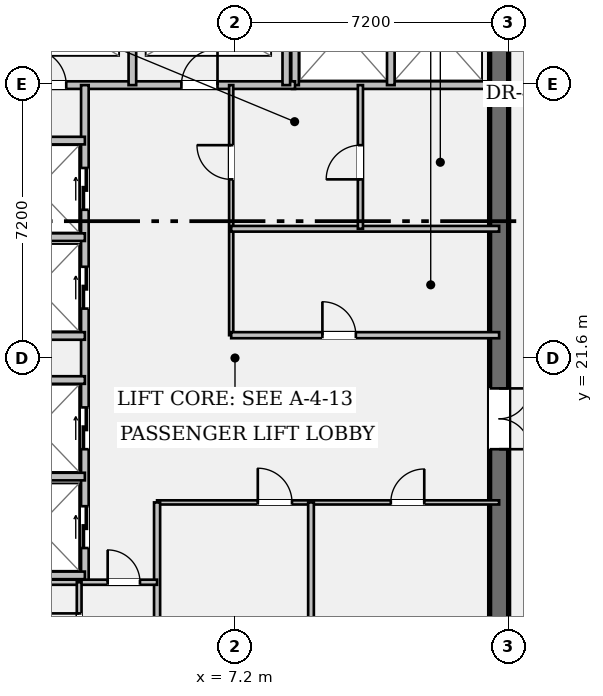
"""IFC4 building model, lengths in metres.
Left out: names, types, materials, properties, quantities, classifications, styles, units other than length and angle.
Written with IfcOpenShell. Run it as: python <this file> out.ifc"""

import sys

from ifc_helpers import new_model, si_unit, direction, frame, frame_2d, origin, place, context, subcontext, project, spatial, rectangle, extrude, element, fill, save


model = new_model("IFC4")
c1 = context("Model", 3, precision=1e-05, world=origin(), true_north=direction((0.0, 1.0)))
c2 = subcontext(c1, "Body", "Model", "MODEL_VIEW")
j1 = project(units=[si_unit("LENGTHUNIT", "METRE"), si_unit("PLANEANGLEUNIT", "RADIAN")], contexts=[c1])
p1 = place(None, origin())
s1 = spatial("IfcSite", under=j1, at=p1, CompositionType="ELEMENT")
p2 = place(p1, origin())
s2 = spatial("IfcBuilding", under=s1, at=p2, CompositionType="ELEMENT")
p3 = place(p2, frame((0.0, 0.0, 255.15)))
s3 = spatial("IfcBuildingStorey", under=s2, at=p3, CompositionType="ELEMENT", Elevation=255.15)
p4 = place(p3, frame((14.15, 35.5, 0.0), z_axis=(0.0, 0.0, 1.0), x_axis=(0.0, -1.0, 0.0)))
e1 = element("IfcWall", 1, at=p4, inside=s3, PredefinedType="SHEAR", context=c2, shape_type="SweptSolid", body=[
    extrude(rectangle(XDim=27.8, YDim=0.5, at=frame_2d((13.9, 0.0))), origin(), (0.0, 0.0, 1.0), 3.24),
])
p5 = place(p4, frame((1.4, 0.0, 0.0)))
e2 = element("IfcOpeningElement", 2, at=p5, cuts=e1, PredefinedType="OPENING", context=c2, shape_type="SweptSolid", body=[
    extrude(rectangle(XDim=1.2, YDim=2.15, at=frame_2d((0.6, 1.075))), frame((0.0, 0.262, 0.0), z_axis=(0.0, -1.0, 0.0), x_axis=(1.0, 0.0, 0.0)), (0.0, 0.0, 1.0), 0.524),
])
p6 = place(p4, frame((25.35, 0.0, 0.0)))
e3 = element("IfcOpeningElement", 3, at=p6, cuts=e1, PredefinedType="OPENING", context=c2, shape_type="SweptSolid", body=[
    extrude(rectangle(XDim=1.2, YDim=2.15, at=frame_2d((0.6, 1.075))), frame((0.0, 0.262, 0.0), z_axis=(0.0, -1.0, 0.0), x_axis=(1.0, 0.0, 0.0)), (0.0, 0.0, 1.0), 0.524),
])
p7 = place(p4, frame((14.7, 0.0, 0.0)))
e4 = element("IfcOpeningElement", 4, at=p7, cuts=e1, PredefinedType="OPENING", context=c2, shape_type="SweptSolid", body=[
    extrude(rectangle(XDim=1.6, YDim=2.2, at=frame_2d((0.8, 1.1))), frame((0.0, 0.262, 0.0), z_axis=(0.0, -1.0, 0.0), x_axis=(1.0, 0.0, 0.0)), (0.0, 0.0, 1.0), 0.524),
])
p8 = place(p3, frame((8.7, 28.78, 0.0), z_axis=(0.0, 0.0, 1.0), x_axis=(1.0, 0.0, 0.0)))
e5 = element("IfcWall", 5, at=p8, inside=s3, PredefinedType="PARTITIONING", context=c2, shape_type="SweptSolid", body=[
    extrude(rectangle(XDim=5.15, YDim=0.2, at=frame_2d((2.575, 0.0))), origin(), (0.0, 0.0, 1.0), 3.24),
])
for number, where, z_axis, x_axis in (
    (6, (8.78, 28.78, 0.0), (0.0, 0.0, 1.0), (0.0, 1.0, 0.0)),
    (7, (11.3, 28.78, 0.0), (0.0, 0.0, 1.0), (0.0, 1.0, 0.0)),
):
    element("IfcWall", number, at=place(p3, frame(where, z_axis=z_axis, x_axis=x_axis)), inside=s3, PredefinedType="PARTITIONING", context=c2, shape_type="SweptSolid", body=[
        extrude(rectangle(XDim=3.1, YDim=0.2, at=frame_2d((1.55, 0.0))), origin(), (0.0, 0.0, 1.0), 3.24),
    ])
p9 = place(p3, frame((0.6, 28.78, 0.0), z_axis=(0.0, 0.0, 1.0), x_axis=(1.0, 0.0, 0.0)))
e8 = element("IfcWall", 8, at=p9, inside=s3, PredefinedType="PARTITIONING", context=c2, shape_type="SweptSolid", body=[
    extrude(rectangle(XDim=8.18, YDim=0.2, at=frame_2d((4.09, 0.0))), origin(), (0.0, 0.0, 1.0), 3.24),
])
p10 = place(p9, frame((1.21, 0.0, 0.0)))
e9 = element("IfcOpeningElement", 9, at=p10, cuts=e8, PredefinedType="OPENING", context=c2, shape_type="SweptSolid", body=[
    extrude(rectangle(XDim=0.95, YDim=2.15, at=frame_2d((0.475, 1.075))), frame((0.0, 0.112, 0.0), z_axis=(0.0, -1.0, 0.0), x_axis=(1.0, 0.0, 0.0)), (0.0, 0.0, 1.0), 0.224),
])
p11 = place(p9, frame((5.19, 0.0, 0.0)))
e10 = element("IfcOpeningElement", 10, at=p11, cuts=e8, PredefinedType="OPENING", context=c2, shape_type="SweptSolid", body=[
    extrude(rectangle(XDim=0.95, YDim=2.15, at=frame_2d((0.475, 1.075))), frame((0.0, 0.112, 0.0), z_axis=(0.0, -1.0, 0.0), x_axis=(1.0, 0.0, 0.0)), (0.0, 0.0, 1.0), 0.224),
])
for number, where, z_axis, x_axis in (
    (11, (4.5, 28.78, 0.0), (0.0, 0.0, 1.0), (0.0, 1.0, 0.0)),
    (12, (8.55, 28.78, 0.0), (0.0, 0.0, 1.0), (0.0, 1.0, 0.0)),
):
    element("IfcWall", number, at=place(p3, frame(where, z_axis=z_axis, x_axis=x_axis)), inside=s3, PredefinedType="PARTITIONING", context=c2, shape_type="SweptSolid", body=[
        extrude(rectangle(XDim=2.94, YDim=0.2, at=frame_2d((1.47, 0.0))), origin(), (0.0, 0.0, 1.0), 3.24),
    ])
p12 = place(p3, frame((3.25, 15.7, 0.0), z_axis=(0.0, 0.0, 1.0), x_axis=(0.0, 1.0, 0.0)))
e13 = element("IfcWall", 13, at=p12, inside=s3, PredefinedType="PARTITIONING", context=c2, shape_type="SweptSolid", body=[
    extrude(rectangle(XDim=13.08, YDim=0.2, at=frame_2d((6.54, 0.0))), origin(), (0.0, 0.0, 1.0), 3.24),
])
p13 = place(p12, frame((0.9, 0.0, 0.0)))
e14 = element("IfcOpeningElement", 14, at=p13, cuts=e13, PredefinedType="OPENING", context=c2, shape_type="SweptSolid", body=[
    extrude(rectangle(XDim=1.1, YDim=2.2, at=frame_2d((0.55, 1.1))), frame((0.0, 0.112, 0.0), z_axis=(0.0, -1.0, 0.0), x_axis=(1.0, 0.0, 0.0)), (0.0, 0.0, 1.0), 0.224),
])
p14 = place(p12, frame((3.5, 0.0, 0.0)))
e15 = element("IfcOpeningElement", 15, at=p14, cuts=e13, PredefinedType="OPENING", context=c2, shape_type="SweptSolid", body=[
    extrude(rectangle(XDim=1.1, YDim=2.2, at=frame_2d((0.55, 1.1))), frame((0.0, 0.112, 0.0), z_axis=(0.0, -1.0, 0.0), x_axis=(1.0, 0.0, 0.0)), (0.0, 0.0, 1.0), 0.224),
])
p15 = place(p12, frame((7.2, 0.0, 0.0)))
e16 = element("IfcOpeningElement", 16, at=p15, cuts=e13, PredefinedType="OPENING", context=c2, shape_type="SweptSolid", body=[
    extrude(rectangle(XDim=1.1, YDim=2.2, at=frame_2d((0.55, 1.1))), frame((0.0, 0.112, 0.0), z_axis=(0.0, -1.0, 0.0), x_axis=(1.0, 0.0, 0.0)), (0.0, 0.0, 1.0), 0.224),
])
p16 = place(p12, frame((9.8, 0.0, 0.0)))
e17 = element("IfcOpeningElement", 17, at=p16, cuts=e13, PredefinedType="OPENING", context=c2, shape_type="SweptSolid", body=[
    extrude(rectangle(XDim=1.1, YDim=2.2, at=frame_2d((0.55, 1.1))), frame((0.0, 0.112, 0.0), z_axis=(0.0, -1.0, 0.0), x_axis=(1.0, 0.0, 0.0)), (0.0, 0.0, 1.0), 0.224),
])
for number, where, z_axis, x_axis in (
    (18, (0.6, 15.88, 0.0), (0.0, 0.0, 1.0), (1.0, 0.0, 0.0)),
    (19, (0.6, 18.48, 0.0), (0.0, 0.0, 1.0), (1.0, 0.0, 0.0)),
    (20, (0.6, 22.18, 0.0), (0.0, 0.0, 1.0), (1.0, 0.0, 0.0)),
    (21, (0.6, 24.78, 0.0), (0.0, 0.0, 1.0), (1.0, 0.0, 0.0)),
    (22, (0.6, 21.02, 0.0), (0.0, 0.0, 1.0), (1.0, 0.0, 0.0)),
    (23, (0.6, 27.32, 0.0), (0.0, 0.0, 1.0), (1.0, 0.0, 0.0)),
):
    element("IfcWall", number, at=place(p3, frame(where, z_axis=z_axis, x_axis=x_axis)), inside=s3, PredefinedType="PARTITIONING", context=c2, shape_type="SweptSolid", body=[
        extrude(rectangle(XDim=2.65, YDim=0.2, at=frame_2d((1.325, 0.0))), origin(), (0.0, 0.0, 1.0), 3.24),
    ])
p17 = place(p3, frame((7.1, 22.2, 0.0), z_axis=(0.0, 0.0, 1.0), x_axis=(0.0, 1.0, 0.0)))
e24 = element("IfcWall", 24, at=p17, inside=s3, PredefinedType="PARTITIONING", context=c2, shape_type="SweptSolid", body=[
    extrude(rectangle(XDim=6.58, YDim=0.11, at=frame_2d((3.29, 0.0))), origin(), (0.0, 0.0, 1.0), 3.24),
])
p18 = place(p17, frame((4.1, 0.0, 0.0)))
e25 = element("IfcOpeningElement", 25, at=p18, cuts=e24, PredefinedType="OPENING", context=c2, shape_type="SweptSolid", body=[
    extrude(rectangle(XDim=0.9, YDim=2.15, at=frame_2d((0.45, 1.075))), frame((0.0, 0.067, 0.0), z_axis=(0.0, -1.0, 0.0), x_axis=(1.0, 0.0, 0.0)), (0.0, 0.0, 1.0), 0.134),
])
p19 = place(p3, frame((7.1, 22.2, 0.0), z_axis=(0.0, 0.0, 1.0), x_axis=(1.0, 0.0, 0.0)))
e26 = element("IfcWall", 26, at=p19, inside=s3, PredefinedType="PARTITIONING", context=c2, shape_type="SweptSolid", body=[
    extrude(rectangle(XDim=7.05, YDim=0.16, at=frame_2d((3.525, 0.0))), origin(), (0.0, 0.0, 1.0), 3.24),
])
p20 = place(p19, frame((2.4, 0.0, 0.0)))
e27 = element("IfcOpeningElement", 27, at=p20, cuts=e26, PredefinedType="OPENING", context=c2, shape_type="SweptSolid", body=[
    extrude(rectangle(XDim=0.88, YDim=2.15, at=frame_2d((0.44, 1.075))), frame((0.0, 0.092, 0.0), z_axis=(0.0, -1.0, 0.0), x_axis=(1.0, 0.0, 0.0)), (0.0, 0.0, 1.0), 0.184),
])
p21 = place(p3, frame((7.1, 25.0, 0.0), z_axis=(0.0, 0.0, 1.0), x_axis=(1.0, 0.0, 0.0)))
e28 = element("IfcWall", 28, at=p21, inside=s3, PredefinedType="PARTITIONING", context=c2, shape_type="SweptSolid", body=[
    extrude(rectangle(XDim=7.05, YDim=0.15, at=frame_2d((3.525, 0.0))), origin(), (0.0, 0.0, 1.0), 3.24),
])
p22 = place(p3, frame((10.5, 25.0, 0.0), z_axis=(0.0, 0.0, 1.0), x_axis=(0.0, 1.0, 0.0)))
e29 = element("IfcWall", 29, at=p22, inside=s3, PredefinedType="PARTITIONING", context=c2, shape_type="SweptSolid", body=[
    extrude(rectangle(XDim=3.78, YDim=0.135, at=frame_2d((1.89, 0.0))), origin(), (0.0, 0.0, 1.0), 3.24),
])
p23 = place(p22, frame((1.3, 0.0, 0.0)))
e30 = element("IfcOpeningElement", 30, at=p23, cuts=e29, PredefinedType="OPENING", context=c2, shape_type="SweptSolid", body=[
    extrude(rectangle(XDim=0.9, YDim=2.15, at=frame_2d((0.45, 1.075))), frame((0.0, 0.08, 0.0), z_axis=(0.0, -1.0, 0.0), x_axis=(1.0, 0.0, 0.0)), (0.0, 0.0, 1.0), 0.159),
])
p24 = place(p3, frame((5.15, 17.8, 0.0), z_axis=(0.0, 0.0, 1.0), x_axis=(1.0, 0.0, 0.0)))
e31 = element("IfcWall", 31, at=p24, inside=s3, PredefinedType="PARTITIONING", context=c2, shape_type="SweptSolid", body=[
    extrude(rectangle(XDim=9.0, YDim=0.11, at=frame_2d((4.5, 0.0))), origin(), (0.0, 0.0, 1.0), 3.24),
])
p25 = place(p24, frame((2.65, 0.0, 0.0)))
e32 = element("IfcOpeningElement", 32, at=p25, cuts=e31, PredefinedType="OPENING", context=c2, shape_type="SweptSolid", body=[
    extrude(rectangle(XDim=0.9, YDim=2.15, at=frame_2d((0.45, 1.075))), frame((0.0, 0.067, 0.0), z_axis=(0.0, -1.0, 0.0), x_axis=(1.0, 0.0, 0.0)), (0.0, 0.0, 1.0), 0.134),
])
p26 = place(p24, frame((6.15, 0.0, 0.0)))
e33 = element("IfcOpeningElement", 33, at=p26, cuts=e31, PredefinedType="OPENING", context=c2, shape_type="SweptSolid", body=[
    extrude(rectangle(XDim=0.88, YDim=2.15, at=frame_2d((0.44, 1.075))), frame((0.0, 0.067, 0.0), z_axis=(0.0, -1.0, 0.0), x_axis=(1.0, 0.0, 0.0)), (0.0, 0.0, 1.0), 0.134),
])
p27 = place(p3, frame((5.15, 11.2, 0.0), z_axis=(0.0, 0.0, 1.0), x_axis=(0.0, 1.0, 0.0)))
e34 = element("IfcWall", 34, at=p27, inside=s3, PredefinedType="PARTITIONING", context=c2, shape_type="SweptSolid", body=[
    extrude(rectangle(XDim=6.6, YDim=0.16, at=frame_2d((3.3, 0.0))), origin(), (0.0, 0.0, 1.0), 3.24),
])
p28 = place(p3, frame((9.2, 11.2, 0.0), z_axis=(0.0, 0.0, 1.0), x_axis=(0.0, 1.0, 0.0)))
e35 = element("IfcWall", 35, at=p28, inside=s3, PredefinedType="PARTITIONING", context=c2, shape_type="SweptSolid", body=[
    extrude(rectangle(XDim=6.6, YDim=0.15, at=frame_2d((3.3, 0.0))), origin(), (0.0, 0.0, 1.0), 3.24),
])
p29 = place(p3, frame((0.6, 15.7, 0.0), z_axis=(0.0, 0.0, 1.0), x_axis=(1.0, 0.0, 0.0)))
e36 = element("IfcWall", 36, at=p29, inside=s3, PredefinedType="PARTITIONING", context=c2, shape_type="SweptSolid", body=[
    extrude(rectangle(XDim=4.55, YDim=0.135, at=frame_2d((2.275, 0.0))), origin(), (0.0, 0.0, 1.0), 3.24),
])
p30 = place(p29, frame((3.25, 0.0, 0.0)))
e37 = element("IfcOpeningElement", 37, at=p30, cuts=e36, PredefinedType="OPENING", context=c2, shape_type="SweptSolid", body=[
    extrude(rectangle(XDim=0.85, YDim=2.15, at=frame_2d((0.425, 1.075))), frame((0.0, 0.08, 0.0), z_axis=(0.0, -1.0, 0.0), x_axis=(1.0, 0.0, 0.0)), (0.0, 0.0, 1.0), 0.159),
])
p31 = place(p3, frame((3.1, 11.28, 0.0), z_axis=(0.0, 0.0, 1.0), x_axis=(0.0, 1.0, 0.0)))
e38 = element("IfcWall", 38, at=p31, inside=s3, PredefinedType="PARTITIONING", context=c2, shape_type="SweptSolid", body=[
    extrude(rectangle(XDim=4.42, YDim=0.125, at=frame_2d((2.21, 0.0))), origin(), (0.0, 0.0, 1.0), 3.24),
])
p32 = place(p31, frame((0.65, 0.0, 0.0)))
e39 = element("IfcOpeningElement", 39, at=p32, cuts=e38, PredefinedType="OPENING", context=c2, shape_type="SweptSolid", body=[
    extrude(rectangle(XDim=0.85, YDim=2.15, at=frame_2d((0.425, 1.075))), frame((0.0, 0.074, 0.0), z_axis=(0.0, -1.0, 0.0), x_axis=(1.0, 0.0, 0.0)), (0.0, 0.0, 1.0), 0.149),
])
p33 = place(p31, frame((2.75, 0.0, 0.0)))
e40 = element("IfcOpeningElement", 40, at=p33, cuts=e38, PredefinedType="OPENING", context=c2, shape_type="SweptSolid", body=[
    extrude(rectangle(XDim=0.85, YDim=2.15, at=frame_2d((0.425, 1.075))), frame((0.0, 0.074, 0.0), z_axis=(0.0, -1.0, 0.0), x_axis=(1.0, 0.0, 0.0)), (0.0, 0.0, 1.0), 0.149),
])
p34 = place(p10, origin())
e41 = element("IfcDoor", 41, at=p34, inside=s3, OperationType="SINGLE_SWING_LEFT", PredefinedType="DOOR", context=c2, shape_type="SweptSolid", body=[
    extrude(rectangle(XDim=0.95, YDim=2.15, at=frame_2d((0.475, 1.075))), frame((0.0, 0.025, 0.0), z_axis=(0.0, -1.0, 0.0), x_axis=(1.0, 0.0, 0.0)), (0.0, 0.0, 1.0), 0.05),
])
fill(e9, e41)
p35 = place(p11, origin())
e42 = element("IfcDoor", 42, at=p35, inside=s3, OperationType="SINGLE_SWING_RIGHT", PredefinedType="DOOR", context=c2, shape_type="SweptSolid", body=[
    extrude(rectangle(XDim=0.95, YDim=2.15, at=frame_2d((0.475, 1.075))), frame((0.0, 0.025, 0.0), z_axis=(0.0, -1.0, 0.0), x_axis=(1.0, 0.0, 0.0)), (0.0, 0.0, 1.0), 0.05),
])
fill(e10, e42)
p36 = place(p7, origin())
e43 = element("IfcDoor", 43, at=p36, inside=s3, OperationType="DOUBLE_DOOR_SINGLE_SWING", PredefinedType="DOOR", context=c2, shape_type="SweptSolid", body=[
    extrude(rectangle(XDim=1.6, YDim=2.2, at=frame_2d((0.8, 1.1))), frame((0.0, 0.025, 0.0), z_axis=(0.0, -1.0, 0.0), x_axis=(1.0, 0.0, 0.0)), (0.0, 0.0, 1.0), 0.05),
])
fill(e4, e43)
p37 = place(p13, origin())
e44 = element("IfcDoor", 44, at=p37, inside=s3, OperationType="DOUBLE_DOOR_SLIDING", PredefinedType="DOOR", context=c2, shape_type="SweptSolid", body=[
    extrude(rectangle(XDim=1.1, YDim=2.2, at=frame_2d((0.55, 1.1))), frame((0.0, 0.025, 0.0), z_axis=(0.0, -1.0, 0.0), x_axis=(1.0, 0.0, 0.0)), (0.0, 0.0, 1.0), 0.05),
])
fill(e14, e44)
p38 = place(p14, origin())
e45 = element("IfcDoor", 45, at=p38, inside=s3, OperationType="DOUBLE_DOOR_SLIDING", PredefinedType="DOOR", context=c2, shape_type="SweptSolid", body=[
    extrude(rectangle(XDim=1.1, YDim=2.2, at=frame_2d((0.55, 1.1))), frame((0.0, 0.025, 0.0), z_axis=(0.0, -1.0, 0.0), x_axis=(1.0, 0.0, 0.0)), (0.0, 0.0, 1.0), 0.05),
])
fill(e15, e45)
p39 = place(p15, origin())
e46 = element("IfcDoor", 46, at=p39, inside=s3, OperationType="DOUBLE_DOOR_SLIDING", PredefinedType="DOOR", context=c2, shape_type="SweptSolid", body=[
    extrude(rectangle(XDim=1.1, YDim=2.2, at=frame_2d((0.55, 1.1))), frame((0.0, 0.025, 0.0), z_axis=(0.0, -1.0, 0.0), x_axis=(1.0, 0.0, 0.0)), (0.0, 0.0, 1.0), 0.05),
])
fill(e16, e46)
p40 = place(p16, origin())
e47 = element("IfcDoor", 47, at=p40, inside=s3, OperationType="DOUBLE_DOOR_SLIDING", PredefinedType="DOOR", context=c2, shape_type="SweptSolid", body=[
    extrude(rectangle(XDim=1.1, YDim=2.2, at=frame_2d((0.55, 1.1))), frame((0.0, 0.025, 0.0), z_axis=(0.0, -1.0, 0.0), x_axis=(1.0, 0.0, 0.0)), (0.0, 0.0, 1.0), 0.05),
])
fill(e17, e47)
p41 = place(p20, origin())
e48 = element("IfcDoor", 48, at=p41, inside=s3, OperationType="SINGLE_SWING_LEFT", PredefinedType="DOOR", context=c2, shape_type="SweptSolid", body=[
    extrude(rectangle(XDim=0.88, YDim=2.15, at=frame_2d((0.44, 1.075))), frame((0.0, 0.025, 0.0), z_axis=(0.0, -1.0, 0.0), x_axis=(1.0, 0.0, 0.0)), (0.0, 0.0, 1.0), 0.05),
])
fill(e27, e48)
p42 = place(p18, origin())
e49 = element("IfcDoor", 49, at=p42, inside=s3, OperationType="SINGLE_SWING_RIGHT", PredefinedType="DOOR", context=c2, shape_type="SweptSolid", body=[
    extrude(rectangle(XDim=0.9, YDim=2.15, at=frame_2d((0.45, 1.075))), frame((0.0, 0.025, 0.0), z_axis=(0.0, -1.0, 0.0), x_axis=(1.0, 0.0, 0.0)), (0.0, 0.0, 1.0), 0.05),
])
fill(e25, e49)
p43 = place(p23, origin())
e50 = element("IfcDoor", 50, at=p43, inside=s3, OperationType="SINGLE_SWING_LEFT", PredefinedType="DOOR", context=c2, shape_type="SweptSolid", body=[
    extrude(rectangle(XDim=0.9, YDim=2.15, at=frame_2d((0.45, 1.075))), frame((0.0, 0.025, 0.0), z_axis=(0.0, -1.0, 0.0), x_axis=(1.0, 0.0, 0.0)), (0.0, 0.0, 1.0), 0.05),
])
fill(e30, e50)
p44 = place(p25, origin())
e51 = element("IfcDoor", 51, at=p44, inside=s3, OperationType="SINGLE_SWING_LEFT", PredefinedType="DOOR", context=c2, shape_type="SweptSolid", body=[
    extrude(rectangle(XDim=0.9, YDim=2.15, at=frame_2d((0.45, 1.075))), frame((0.0, 0.025, 0.0), z_axis=(0.0, -1.0, 0.0), x_axis=(1.0, 0.0, 0.0)), (0.0, 0.0, 1.0), 0.05),
])
fill(e32, e51)
p45 = place(p26, origin())
e52 = element("IfcDoor", 52, at=p45, inside=s3, OperationType="SINGLE_SWING_RIGHT", PredefinedType="DOOR", context=c2, shape_type="SweptSolid", body=[
    extrude(rectangle(XDim=0.88, YDim=2.15, at=frame_2d((0.44, 1.075))), frame((0.0, 0.025, 0.0), z_axis=(0.0, -1.0, 0.0), x_axis=(1.0, 0.0, 0.0)), (0.0, 0.0, 1.0), 0.05),
])
fill(e33, e52)
p46 = place(p30, origin())
e53 = element("IfcDoor", 53, at=p46, inside=s3, OperationType="SINGLE_SWING_LEFT", PredefinedType="DOOR", context=c2, shape_type="SweptSolid", body=[
    extrude(rectangle(XDim=0.85, YDim=2.15, at=frame_2d((0.425, 1.075))), frame((0.0, 0.025, 0.0), z_axis=(0.0, -1.0, 0.0), x_axis=(1.0, 0.0, 0.0)), (0.0, 0.0, 1.0), 0.05),
])
fill(e37, e53)
p47 = place(p33, origin())
e54 = element("IfcDoor", 54, at=p47, inside=s3, OperationType="SINGLE_SWING_RIGHT", PredefinedType="DOOR", context=c2, shape_type="SweptSolid", body=[
    extrude(rectangle(XDim=0.85, YDim=2.15, at=frame_2d((0.425, 1.075))), frame((0.0, 0.025, 0.0), z_axis=(0.0, -1.0, 0.0), x_axis=(1.0, 0.0, 0.0)), (0.0, 0.0, 1.0), 0.05),
])
fill(e40, e54)
save(model, sys.argv[1])
